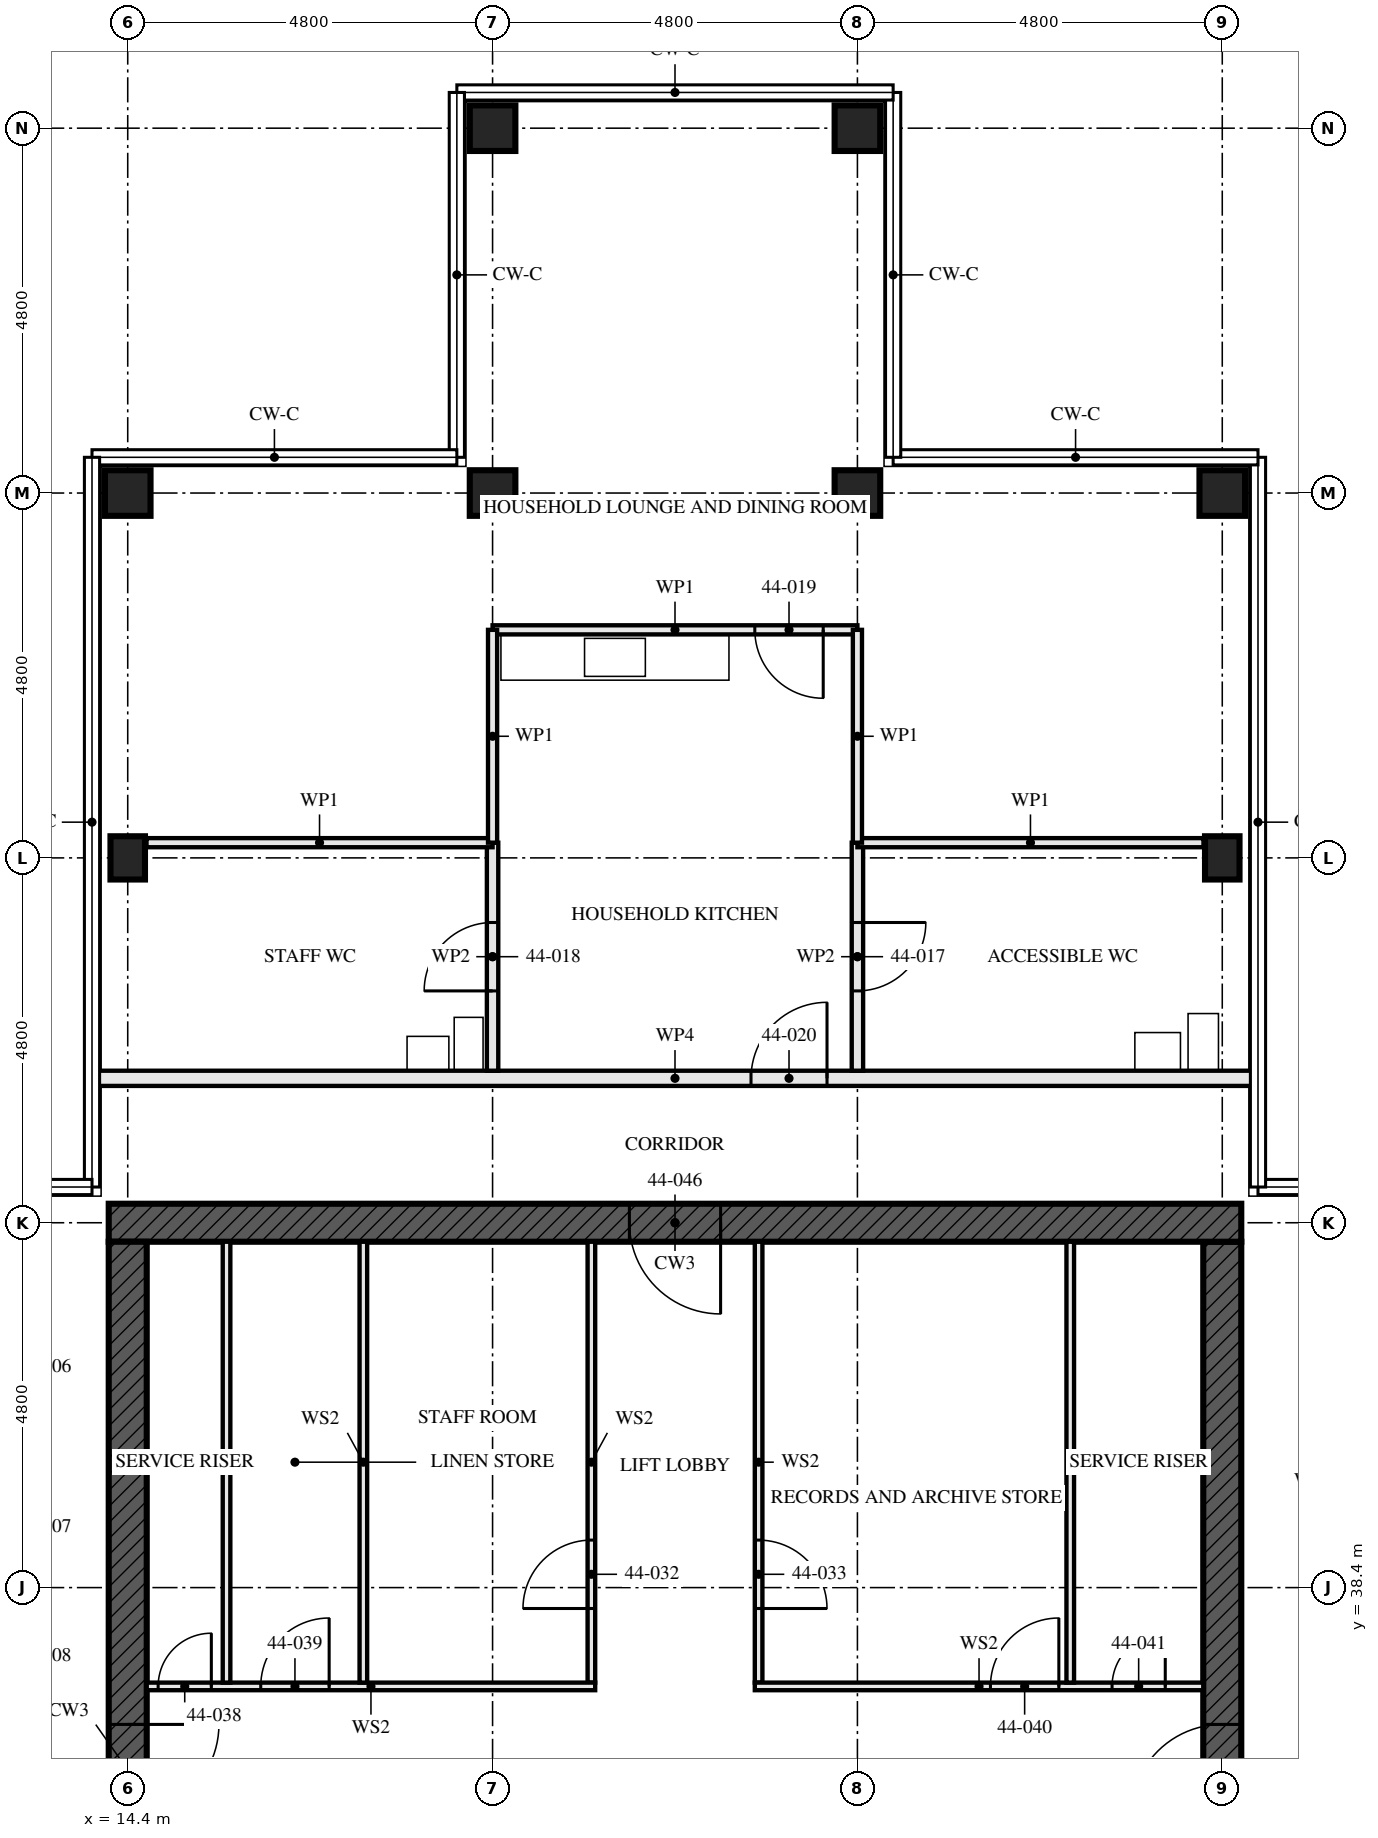
"""IFC4 building model, lengths in metres.
Left out: names, types, materials, properties, quantities, classifications, styles, units other than length and angle.
Written with IfcOpenShell. Run it as: python <this file> out.ifc"""

import sys

from ifc_helpers import new_model, si_unit, direction, frame, frame_2d, origin, origin_2d, place, context, subcontext, project, spatial, rectangle, hollow_rectangle, i_section, extrude, element, fill, save


model = new_model("IFC4")
c1 = context("Model", 3, precision=1e-05, world=origin(), true_north=direction((0.0, 1.0)))
c2 = subcontext(c1, "Body", "Model", "MODEL_VIEW")
j1 = project(units=[si_unit("LENGTHUNIT", "METRE"), si_unit("PLANEANGLEUNIT", "RADIAN")], contexts=[c1])
p1 = place(None, origin())
s1 = spatial("IfcSite", under=j1, at=p1, CompositionType="ELEMENT")
p2 = place(p1, origin())
s2 = spatial("IfcBuilding", under=s1, at=p2, CompositionType="ELEMENT")
p3 = place(p2, frame((0.0, 0.0, 162.0)))
s3 = spatial("IfcBuildingStorey", under=s2, at=p3, CompositionType="ELEMENT", Elevation=162.0)
p4 = place(p3, frame((14.4, 48.0, 0.0), z_axis=(0.0, 0.0, 1.0), x_axis=(1.0, 0.0, 0.0)))
e1 = element("IfcColumn", 1, at=p4, inside=s3, PredefinedType="COLUMN", context=c2, shape_type="SweptSolid", body=[
    extrude(i_section(OverallWidth=0.454, OverallDepth=0.569, WebThickness=0.078, FlangeThickness=0.125, FilletRadius=0.015, at=origin_2d()), origin(), (0.0, 0.0, 1.0), 3.5),
])
for number, where, z_axis, x_axis in (
    (2, (14.4, 52.8, 0.0), (0.0, 0.0, 1.0), (0.0, 1.0, 0.0)),
    (3, (19.2, 52.8, 0.0), (0.0, 0.0, 1.0), (0.0, 1.0, 0.0)),
    (4, (19.2, 57.6, 0.0), (0.0, 0.0, 1.0), (0.0, 1.0, 0.0)),
    (5, (24.0, 52.8, 0.0), (0.0, 0.0, 1.0), (0.0, 1.0, 0.0)),
    (6, (24.0, 57.6, 0.0), (0.0, 0.0, 1.0), (0.0, 1.0, 0.0)),
):
    element("IfcColumn", number, at=place(p3, frame(where, z_axis=z_axis, x_axis=x_axis)), inside=s3, PredefinedType="COLUMN", context=c2, shape_type="SweptSolid", body=[
        extrude(hollow_rectangle(XDim=0.6, YDim=0.6, WallThickness=0.05, at=origin_2d()), origin(), (0.0, 0.0, 1.0), 3.5),
    ])
p5 = place(p3, frame((28.8, 48.0, 0.0), z_axis=(0.0, 0.0, 1.0), x_axis=(1.0, 0.0, 0.0)))
e7 = element("IfcColumn", 7, at=p5, inside=s3, PredefinedType="COLUMN", context=c2, shape_type="SweptSolid", body=[
    extrude(i_section(OverallWidth=0.454, OverallDepth=0.569, WebThickness=0.078, FlangeThickness=0.125, FilletRadius=0.015, at=origin_2d()), origin(), (0.0, 0.0, 1.0), 3.5),
])
p6 = place(p3, frame((28.8, 52.8, 0.0), z_axis=(0.0, 0.0, 1.0), x_axis=(0.0, 1.0, 0.0)))
e8 = element("IfcColumn", 8, at=p6, inside=s3, PredefinedType="COLUMN", context=c2, shape_type="SweptSolid", body=[
    extrude(hollow_rectangle(XDim=0.6, YDim=0.6, WallThickness=0.05, at=origin_2d()), origin(), (0.0, 0.0, 1.0), 3.5),
])
p7 = place(p3, frame((29.05, 43.2, -0.17), z_axis=(0.0, 0.0, 1.0), x_axis=(-1.0, 0.0, 0.0)))
e9 = element("IfcWall", 9, at=p7, inside=s3, PredefinedType="SHEAR", context=c2, shape_type="SweptSolid", body=[
    extrude(rectangle(XDim=14.9, YDim=0.5, at=frame_2d((7.45, 0.0))), origin(), (0.0, 0.0, 1.0), 3.5),
])
p8 = place(p7, frame((6.85, 0.0, 0.17)))
e10 = element("IfcOpeningElement", 10, at=p8, cuts=e9, PredefinedType="OPENING", context=c2, shape_type="SweptSolid", body=[
    extrude(rectangle(XDim=1.2, YDim=2.1, at=frame_2d((0.6, 1.05))), frame((0.0, 0.26, 0.0), z_axis=(0.0, -1.0, 0.0), x_axis=(1.0, 0.0, 0.0)), (0.0, 0.0, 1.0), 0.521),
])
p9 = place(p3, frame((14.4, 42.95, -0.17), z_axis=(0.0, 0.0, 1.0), x_axis=(0.0, -1.0, 0.0)))
e11 = element("IfcWall", 11, at=p9, inside=s3, PredefinedType="SHEAR", context=c2, shape_type="SweptSolid", body=[
    extrude(rectangle(XDim=13.9, YDim=0.5, at=frame_2d((6.95, 0.0))), origin(), (0.0, 0.0, 1.0), 3.5),
])
p10 = place(p9, frame((6.35, 0.0, 0.17)))
e12 = element("IfcOpeningElement", 12, at=p10, cuts=e11, PredefinedType="OPENING", context=c2, shape_type="SweptSolid", body=[
    extrude(rectangle(XDim=1.2, YDim=2.1, at=frame_2d((0.6, 1.05))), frame((0.0, 0.26, 0.0), z_axis=(0.0, -1.0, 0.0), x_axis=(1.0, 0.0, 0.0)), (0.0, 0.0, 1.0), 0.521),
])
p11 = place(p3, frame((28.8, 29.05, -0.17), z_axis=(0.0, 0.0, 1.0), x_axis=(0.0, 1.0, 0.0)))
e13 = element("IfcWall", 13, at=p11, inside=s3, PredefinedType="SHEAR", context=c2, shape_type="SweptSolid", body=[
    extrude(rectangle(XDim=13.9, YDim=0.5, at=frame_2d((6.95, 0.0))), origin(), (0.0, 0.0, 1.0), 3.5),
])
p12 = place(p11, frame((6.35, 0.0, 0.17)))
e14 = element("IfcOpeningElement", 14, at=p12, cuts=e13, PredefinedType="OPENING", context=c2, shape_type="SweptSolid", body=[
    extrude(rectangle(XDim=1.2, YDim=2.1, at=frame_2d((0.6, 1.05))), frame((0.0, 0.26, 0.0), z_axis=(0.0, -1.0, 0.0), x_axis=(1.0, 0.0, 0.0)), (0.0, 0.0, 1.0), 0.521),
])
p13 = place(p3, frame((24.0, 48.2, 0.0), z_axis=(0.0, 0.0, 1.0), x_axis=(0.0, -1.0, 0.0)))
e15 = element("IfcWall", 15, at=p13, inside=s3, PredefinedType="PARTITIONING", context=c2, shape_type="SweptSolid", body=[
    extrude(rectangle(XDim=3.0, YDim=0.15, at=frame_2d((1.5, 0.0))), origin(), (0.0, 0.0, 1.0), 2.55),
])
p14 = place(p13, frame((1.05, 0.0, 0.0)))
e16 = element("IfcOpeningElement", 16, at=p14, cuts=e15, PredefinedType="OPENING", context=c2, shape_type="SweptSolid", body=[
    extrude(rectangle(XDim=0.9, YDim=2.1, at=frame_2d((0.45, 1.05))), frame((0.0, 0.085, 0.0), z_axis=(0.0, -1.0, 0.0), x_axis=(1.0, 0.0, 0.0)), (0.0, 0.0, 1.0), 0.171),
])
p15 = place(p3, frame((19.2, 48.2, 0.0), z_axis=(0.0, 0.0, 1.0), x_axis=(0.0, -1.0, 0.0)))
e17 = element("IfcWall", 17, at=p15, inside=s3, PredefinedType="PARTITIONING", context=c2, shape_type="SweptSolid", body=[
    extrude(rectangle(XDim=3.0, YDim=0.15, at=frame_2d((1.5, 0.0))), origin(), (0.0, 0.0, 1.0), 2.55),
])
p16 = place(p15, frame((1.05, 0.0, 0.0)))
e18 = element("IfcOpeningElement", 18, at=p16, cuts=e17, PredefinedType="OPENING", context=c2, shape_type="SweptSolid", body=[
    extrude(rectangle(XDim=0.9, YDim=2.1, at=frame_2d((0.45, 1.05))), frame((0.0, 0.085, 0.0), z_axis=(0.0, -1.0, 0.0), x_axis=(1.0, 0.0, 0.0)), (0.0, 0.0, 1.0), 0.171),
])
p17 = place(p3, frame((28.553, 48.2, 0.0), z_axis=(0.0, 0.0, 1.0), x_axis=(-1.0, 0.0, 0.0)))
e19 = element("IfcWall", 19, at=p17, inside=s3, PredefinedType="PARTITIONING", context=c2, shape_type="SweptSolid", body=[
    extrude(rectangle(XDim=4.553, YDim=0.12, at=frame_2d((2.276, 0.0))), origin(), (0.0, 0.0, 1.0), 3.33),
])
p18 = place(p3, frame((24.0, 51.0, 0.0), z_axis=(0.0, 0.0, 1.0), x_axis=(-1.0, 0.0, 0.0)))
e20 = element("IfcWall", 20, at=p18, inside=s3, PredefinedType="PARTITIONING", context=c2, shape_type="SweptSolid", body=[
    extrude(rectangle(XDim=4.8, YDim=0.12, at=frame_2d((2.4, 0.0))), origin(), (0.0, 0.0, 1.0), 3.33),
])
p19 = place(p18, frame((0.45, 0.0, 0.0)))
e21 = element("IfcOpeningElement", 21, at=p19, cuts=e20, PredefinedType="OPENING", context=c2, shape_type="SweptSolid", body=[
    extrude(rectangle(XDim=0.9, YDim=2.1, at=frame_2d((0.45, 1.05))), frame((0.0, 0.071, 0.0), z_axis=(0.0, -1.0, 0.0), x_axis=(1.0, 0.0, 0.0)), (0.0, 0.0, 1.0), 0.141),
])
p20 = place(p3, frame((19.2, 48.2, 0.0), z_axis=(0.0, 0.0, 1.0), x_axis=(-1.0, 0.0, 0.0)))
e22 = element("IfcWall", 22, at=p20, inside=s3, PredefinedType="PARTITIONING", context=c2, shape_type="SweptSolid", body=[
    extrude(rectangle(XDim=4.553, YDim=0.12, at=frame_2d((2.276, 0.0))), origin(), (0.0, 0.0, 1.0), 3.33),
])
for number, where, z_axis, x_axis in (
    (23, (24.0, 51.0, 0.0), (0.0, 0.0, 1.0), (0.0, -1.0, 0.0)),
    (24, (19.2, 51.0, 0.0), (0.0, 0.0, 1.0), (0.0, -1.0, 0.0)),
):
    element("IfcWall", number, at=place(p3, frame(where, z_axis=z_axis, x_axis=x_axis)), inside=s3, PredefinedType="PARTITIONING", context=c2, shape_type="SweptSolid", body=[
        extrude(rectangle(XDim=2.8, YDim=0.12, at=frame_2d((1.4, 0.0))), origin(), (0.0, 0.0, 1.0), 3.33),
    ])
p21 = place(p3, frame((29.25, 45.1, 0.0), z_axis=(0.0, 0.0, 1.0), x_axis=(-1.0, 0.0, 0.0)))
e25 = element("IfcWall", 25, at=p21, inside=s3, PredefinedType="PARTITIONING", context=c2, shape_type="SweptSolid", body=[
    extrude(rectangle(XDim=15.3, YDim=0.2, at=frame_2d((7.65, 0.0))), origin(), (0.0, 0.0, 1.0), 2.32),
])
p22 = place(p21, frame((5.65, 0.0, 0.0)))
e26 = element("IfcOpeningElement", 26, at=p22, cuts=e25, PredefinedType="OPENING", context=c2, shape_type="SweptSolid", body=[
    extrude(rectangle(XDim=1.0, YDim=2.1, at=frame_2d((0.5, 1.05))), frame((0.0, 0.111, 0.0), z_axis=(0.0, -1.0, 0.0), x_axis=(1.0, 0.0, 0.0)), (0.0, 0.0, 1.0), 0.221),
])
for number, where, z_axis, x_axis in (
    (27, (15.7, 37.15, 0.0), (0.0, 0.0, 1.0), (0.0, 1.0, 0.0)),
    (28, (26.8, 37.15, 0.0), (0.0, 0.0, 1.0), (0.0, 1.0, 0.0)),
):
    element("IfcWall", number, at=place(p3, frame(where, z_axis=z_axis, x_axis=x_axis)), inside=s3, PredefinedType="SOLIDWALL", context=c2, shape_type="SweptSolid", body=[
        extrude(rectangle(XDim=5.8, YDim=0.1, at=frame_2d((2.9, 0.0))), origin(), (0.0, 0.0, 1.0), 3.33),
    ])
p23 = place(p3, frame((20.5, 37.15, 0.0), z_axis=(0.0, 0.0, 1.0), x_axis=(0.0, 1.0, 0.0)))
e29 = element("IfcWall", 29, at=p23, inside=s3, PredefinedType="SOLIDWALL", context=c2, shape_type="SweptSolid", body=[
    extrude(rectangle(XDim=5.8, YDim=0.1, at=frame_2d((2.9, 0.0))), origin(), (0.0, 0.0, 1.0), 3.33),
])
p24 = place(p23, frame((0.975, 0.0, 0.0)))
e30 = element("IfcOpeningElement", 30, at=p24, cuts=e29, PredefinedType="OPENING", context=c2, shape_type="SweptSolid", body=[
    extrude(rectangle(XDim=0.9, YDim=2.1, at=frame_2d((0.45, 1.05))), frame((0.0, 0.061, 0.0), z_axis=(0.0, -1.0, 0.0), x_axis=(1.0, 0.0, 0.0)), (0.0, 0.0, 1.0), 0.121),
])
p25 = place(p3, frame((22.7, 37.15, 0.0), z_axis=(0.0, 0.0, 1.0), x_axis=(0.0, 1.0, 0.0)))
e31 = element("IfcWall", 31, at=p25, inside=s3, PredefinedType="SOLIDWALL", context=c2, shape_type="SweptSolid", body=[
    extrude(rectangle(XDim=5.8, YDim=0.1, at=frame_2d((2.9, 0.0))), origin(), (0.0, 0.0, 1.0), 3.33),
])
p26 = place(p25, frame((0.975, 0.0, 0.0)))
e32 = element("IfcOpeningElement", 32, at=p26, cuts=e31, PredefinedType="OPENING", context=c2, shape_type="SweptSolid", body=[
    extrude(rectangle(XDim=0.9, YDim=2.1, at=frame_2d((0.45, 1.05))), frame((0.0, 0.061, 0.0), z_axis=(0.0, -1.0, 0.0), x_axis=(1.0, 0.0, 0.0)), (0.0, 0.0, 1.0), 0.121),
])
p27 = place(p3, frame((14.65, 37.1, 0.0), z_axis=(0.0, 0.0, 1.0), x_axis=(1.0, 0.0, 0.0)))
e33 = element("IfcWall", 33, at=p27, inside=s3, PredefinedType="SOLIDWALL", context=c2, shape_type="SweptSolid", body=[
    extrude(rectangle(XDim=5.9, YDim=0.1, at=frame_2d((2.95, 0.0))), origin(), (0.0, 0.0, 1.0), 3.33),
])
p28 = place(p27, frame((0.15, 0.0, 0.0)))
e34 = element("IfcOpeningElement", 34, at=p28, cuts=e33, PredefinedType="OPENING", context=c2, shape_type="SweptSolid", body=[
    extrude(rectangle(XDim=0.7, YDim=2.1, at=frame_2d((0.35, 1.05))), frame((0.0, 0.061, 0.0), z_axis=(0.0, -1.0, 0.0), x_axis=(1.0, 0.0, 0.0)), (0.0, 0.0, 1.0), 0.121),
])
p29 = place(p27, frame((1.5, 0.0, 0.0)))
e35 = element("IfcOpeningElement", 35, at=p29, cuts=e33, PredefinedType="OPENING", context=c2, shape_type="SweptSolid", body=[
    extrude(rectangle(XDim=0.9, YDim=2.1, at=frame_2d((0.45, 1.05))), frame((0.0, 0.061, 0.0), z_axis=(0.0, -1.0, 0.0), x_axis=(1.0, 0.0, 0.0)), (0.0, 0.0, 1.0), 0.121),
])
p30 = place(p3, frame((22.65, 37.1, 0.0), z_axis=(0.0, 0.0, 1.0), x_axis=(1.0, 0.0, 0.0)))
e36 = element("IfcWall", 36, at=p30, inside=s3, PredefinedType="SOLIDWALL", context=c2, shape_type="SweptSolid", body=[
    extrude(rectangle(XDim=5.9, YDim=0.1, at=frame_2d((2.95, 0.0))), origin(), (0.0, 0.0, 1.0), 3.33),
])
p31 = place(p30, frame((3.1, 0.0, 0.0)))
e37 = element("IfcOpeningElement", 37, at=p31, cuts=e36, PredefinedType="OPENING", context=c2, shape_type="SweptSolid", body=[
    extrude(rectangle(XDim=0.9, YDim=2.1, at=frame_2d((0.45, 1.05))), frame((0.0, 0.061, 0.0), z_axis=(0.0, -1.0, 0.0), x_axis=(1.0, 0.0, 0.0)), (0.0, 0.0, 1.0), 0.121),
])
p32 = place(p30, frame((4.7, 0.0, 0.0)))
e38 = element("IfcOpeningElement", 38, at=p32, cuts=e36, PredefinedType="OPENING", context=c2, shape_type="SweptSolid", body=[
    extrude(rectangle(XDim=0.7, YDim=2.1, at=frame_2d((0.35, 1.05))), frame((0.0, 0.061, 0.0), z_axis=(0.0, -1.0, 0.0), x_axis=(1.0, 0.0, 0.0)), (0.0, 0.0, 1.0), 0.121),
])
p33 = place(p3, frame((17.5, 37.15, 0.0), z_axis=(0.0, 0.0, 1.0), x_axis=(0.0, 1.0, 0.0)))
e39 = element("IfcWall", 39, at=p33, inside=s3, PredefinedType="SOLIDWALL", context=c2, shape_type="SweptSolid", body=[
    extrude(rectangle(XDim=5.8, YDim=0.1, at=frame_2d((2.9, 0.0))), origin(), (0.0, 0.0, 1.0), 3.33),
])
p34 = place(p14, origin())
e40 = element("IfcDoor", 40, at=p34, inside=s3, OperationType="SINGLE_SWING_RIGHT", PredefinedType="DOOR", context=c2, shape_type="SweptSolid", body=[
    extrude(rectangle(XDim=0.9, YDim=2.1, at=frame_2d((0.45, 1.05))), frame((0.0, 0.022, 0.0), z_axis=(0.0, -1.0, 0.0), x_axis=(1.0, 0.0, 0.0)), (0.0, 0.0, 1.0), 0.044),
])
fill(e16, e40)
p35 = place(p16, frame((0.9, 0.0, 0.0), z_axis=(0.0, 0.0, 1.0), x_axis=(-1.0, 0.0, 0.0)))
e41 = element("IfcDoor", 41, at=p35, inside=s3, OperationType="SINGLE_SWING_RIGHT", PredefinedType="DOOR", context=c2, shape_type="SweptSolid", body=[
    extrude(rectangle(XDim=0.9, YDim=2.1, at=frame_2d((0.45, 1.05))), frame((0.0, 0.022, 0.0), z_axis=(0.0, -1.0, 0.0), x_axis=(1.0, 0.0, 0.0)), (0.0, 0.0, 1.0), 0.044),
])
fill(e18, e41)
p36 = place(p19, origin())
e42 = element("IfcDoor", 42, at=p36, inside=s3, OperationType="SINGLE_SWING_RIGHT", PredefinedType="DOOR", context=c2, shape_type="SweptSolid", body=[
    extrude(rectangle(XDim=0.9, YDim=2.1, at=frame_2d((0.45, 1.05))), frame((0.0, 0.022, 0.0), z_axis=(0.0, -1.0, 0.0), x_axis=(1.0, 0.0, 0.0)), (0.0, 0.0, 1.0), 0.044),
])
fill(e21, e42)
p37 = place(p22, frame((1.0, 0.0, 0.0), z_axis=(0.0, 0.0, 1.0), x_axis=(-1.0, 0.0, 0.0)))
e43 = element("IfcDoor", 43, at=p37, inside=s3, OperationType="SINGLE_SWING_LEFT", PredefinedType="DOOR", context=c2, shape_type="SweptSolid", body=[
    extrude(rectangle(XDim=1.0, YDim=2.1, at=frame_2d((0.5, 1.05))), frame((0.0, 0.027, 0.0), z_axis=(0.0, -1.0, 0.0), x_axis=(1.0, 0.0, 0.0)), (0.0, 0.0, 1.0), 0.054),
])
fill(e26, e43)
p38 = place(p24, origin())
e44 = element("IfcDoor", 44, at=p38, inside=s3, OperationType="SINGLE_SWING_RIGHT", PredefinedType="DOOR", context=c2, shape_type="SweptSolid", body=[
    extrude(rectangle(XDim=0.9, YDim=2.1, at=frame_2d((0.45, 1.05))), frame((0.0, 0.027, 0.0), z_axis=(0.0, -1.0, 0.0), x_axis=(1.0, 0.0, 0.0)), (0.0, 0.0, 1.0), 0.054),
])
fill(e30, e44)
p39 = place(p26, frame((0.9, 0.0, 0.0), z_axis=(0.0, 0.0, 1.0), x_axis=(-1.0, 0.0, 0.0)))
e45 = element("IfcDoor", 45, at=p39, inside=s3, OperationType="SINGLE_SWING_LEFT", PredefinedType="DOOR", context=c2, shape_type="SweptSolid", body=[
    extrude(rectangle(XDim=0.9, YDim=2.1, at=frame_2d((0.45, 1.05))), frame((0.0, 0.027, 0.0), z_axis=(0.0, -1.0, 0.0), x_axis=(1.0, 0.0, 0.0)), (0.0, 0.0, 1.0), 0.054),
])
fill(e32, e45)
p40 = place(p28, origin())
e46 = element("IfcDoor", 46, at=p40, inside=s3, OperationType="SINGLE_SWING_LEFT", PredefinedType="DOOR", context=c2, shape_type="SweptSolid", body=[
    extrude(rectangle(XDim=0.7, YDim=2.1, at=frame_2d((0.35, 1.05))), frame((0.0, 0.027, 0.0), z_axis=(0.0, -1.0, 0.0), x_axis=(1.0, 0.0, 0.0)), (0.0, 0.0, 1.0), 0.054),
])
fill(e34, e46)
p41 = place(p29, origin())
e47 = element("IfcDoor", 47, at=p41, inside=s3, OperationType="SINGLE_SWING_LEFT", PredefinedType="DOOR", context=c2, shape_type="SweptSolid", body=[
    extrude(rectangle(XDim=0.9, YDim=2.1, at=frame_2d((0.45, 1.05))), frame((0.0, 0.027, 0.0), z_axis=(0.0, -1.0, 0.0), x_axis=(1.0, 0.0, 0.0)), (0.0, 0.0, 1.0), 0.054),
])
fill(e35, e47)
p42 = place(p31, origin())
e48 = element("IfcDoor", 48, at=p42, inside=s3, OperationType="SINGLE_SWING_LEFT", PredefinedType="DOOR", context=c2, shape_type="SweptSolid", body=[
    extrude(rectangle(XDim=0.9, YDim=2.1, at=frame_2d((0.45, 1.05))), frame((0.0, 0.027, 0.0), z_axis=(0.0, -1.0, 0.0), x_axis=(1.0, 0.0, 0.0)), (0.0, 0.0, 1.0), 0.054),
])
fill(e37, e48)
p43 = place(p32, origin())
e49 = element("IfcDoor", 49, at=p43, inside=s3, OperationType="SINGLE_SWING_LEFT", PredefinedType="DOOR", context=c2, shape_type="SweptSolid", body=[
    extrude(rectangle(XDim=0.7, YDim=2.1, at=frame_2d((0.35, 1.05))), frame((0.0, 0.027, 0.0), z_axis=(0.0, -1.0, 0.0), x_axis=(1.0, 0.0, 0.0)), (0.0, 0.0, 1.0), 0.054),
])
fill(e38, e49)
p44 = place(p10, origin())
e50 = element("IfcDoor", 50, at=p44, inside=s3, OperationType="SINGLE_SWING_LEFT", PredefinedType="DOOR", context=c2, shape_type="SweptSolid", body=[
    extrude(rectangle(XDim=1.2, YDim=2.1, at=frame_2d((0.6, 1.05))), frame((0.0, 0.027, 0.0), z_axis=(0.0, -1.0, 0.0), x_axis=(1.0, 0.0, 0.0)), (0.0, 0.0, 1.0), 0.054),
])
fill(e12, e50)
p45 = place(p12, origin())
e51 = element("IfcDoor", 51, at=p45, inside=s3, OperationType="SINGLE_SWING_LEFT", PredefinedType="DOOR", context=c2, shape_type="SweptSolid", body=[
    extrude(rectangle(XDim=1.2, YDim=2.1, at=frame_2d((0.6, 1.05))), frame((0.0, 0.027, 0.0), z_axis=(0.0, -1.0, 0.0), x_axis=(1.0, 0.0, 0.0)), (0.0, 0.0, 1.0), 0.054),
])
fill(e14, e51)
p46 = place(p8, origin())
e52 = element("IfcDoor", 52, at=p46, inside=s3, OperationType="SINGLE_SWING_LEFT", PredefinedType="DOOR", context=c2, shape_type="SweptSolid", body=[
    extrude(rectangle(XDim=1.2, YDim=2.1, at=frame_2d((0.6, 1.05))), frame((0.0, 0.027, 0.0), z_axis=(0.0, -1.0, 0.0), x_axis=(1.0, 0.0, 0.0)), (0.0, 0.0, 1.0), 0.054),
])
fill(e10, e52)
save(model, sys.argv[1])
